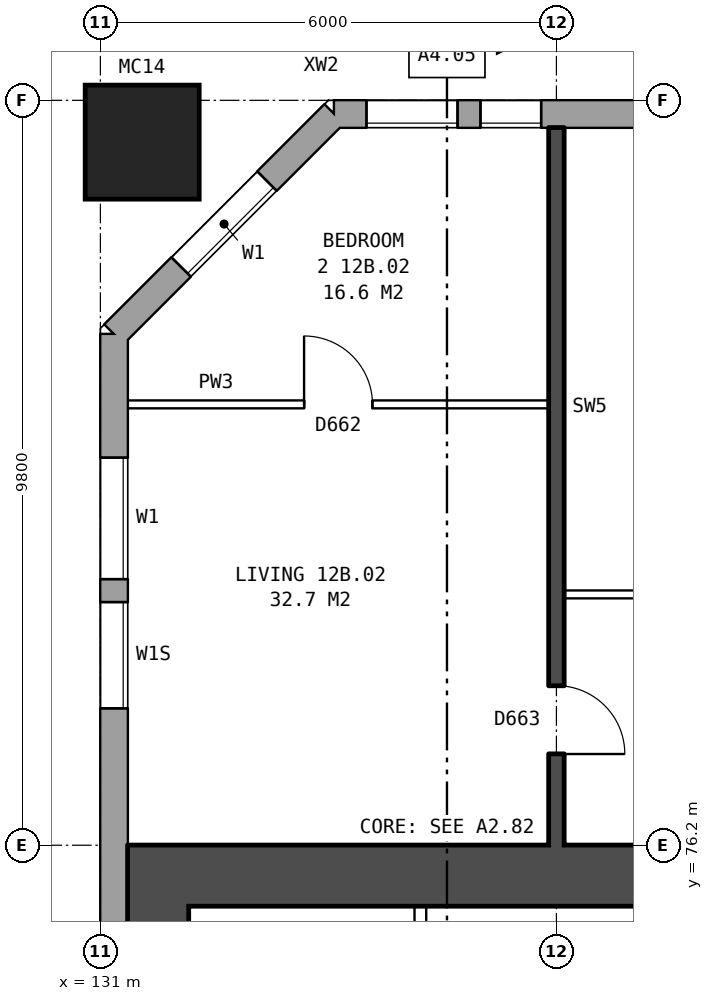
"""IFC4 building model, lengths in metres.
Left out: names, types, materials, properties, quantities, classifications, styles, units other than length and angle.
Written with IfcOpenShell. Run it as: python <this file> out.ifc"""

import sys

from ifc_helpers import new_model, si_unit, direction, frame, frame_2d, origin, origin_2d, place, context, subcontext, project, spatial, rectangle, hollow_rectangle, extrude, element, fill, save


model = new_model("IFC4")
c1 = context("Model", 3, precision=1e-05, world=origin(), true_north=direction((0.0, 1.0)))
c2 = subcontext(c1, "Body", "Model", "MODEL_VIEW")
j1 = project(units=[si_unit("LENGTHUNIT", "METRE"), si_unit("PLANEANGLEUNIT", "RADIAN")], contexts=[c1])
p1 = place(None, origin())
s1 = spatial("IfcSite", under=j1, at=p1, CompositionType="ELEMENT")
p2 = place(p1, origin())
s2 = spatial("IfcBuilding", under=s1, at=p2, CompositionType="ELEMENT")
p3 = place(p2, frame((0.0, 0.0, 47.4)))
s3 = spatial("IfcBuildingStorey", under=s2, at=p3, CompositionType="ELEMENT", Elevation=47.4)
p4 = place(p3, frame((131.55, 85.45, 0.0), z_axis=(0.0, 0.0, 1.0), x_axis=(1.0, 0.0, 0.0)))
e1 = element("IfcColumn", 1, at=p4, inside=s3, PredefinedType="COLUMN", context=c2, shape_type="SweptSolid", body=[
    extrude(hollow_rectangle(XDim=1.5, YDim=1.5, WallThickness=0.08, at=origin_2d()), origin(), (0.0, 0.0, 1.0), 3.1),
])
p5 = place(p3, frame((173.425, 85.82, 0.0), z_axis=(0.0, 0.0, 1.0), x_axis=(-1.0, 0.0, 0.0)))
e2 = element("IfcWall", 2, at=p5, inside=s3, PredefinedType="STANDARD", context=c2, shape_type="SweptSolid", body=[
    extrude(rectangle(XDim=39.351, YDim=0.36, at=frame_2d((19.675, 0.0))), origin(), (0.0, 0.0, 1.0), 2.85),
])
p6 = place(p5, frame((0.625, 0.0, 0.8)))
e3 = element("IfcOpeningElement", 3, at=p6, cuts=e2, PredefinedType="OPENING", context=c2, shape_type="SweptSolid", body=[
    extrude(rectangle(XDim=1.0, YDim=1.8, at=frame_2d((0.5, 0.9))), frame((0.0, 0.19, 0.0), z_axis=(0.0, -1.0, 0.0), x_axis=(1.0, 0.0, 0.0)), (0.0, 0.0, 1.0), 0.38),
])
p7 = place(p5, frame((1.925, 0.0, 1.7)))
e4 = element("IfcOpeningElement", 4, at=p7, cuts=e2, PredefinedType="OPENING", context=c2, shape_type="SweptSolid", body=[
    extrude(rectangle(XDim=0.8, YDim=0.9, at=frame_2d((0.4, 0.45))), frame((0.0, 0.19, 0.0), z_axis=(0.0, -1.0, 0.0), x_axis=(1.0, 0.0, 0.0)), (0.0, 0.0, 1.0), 0.38),
])
p8 = place(p5, frame((7.125, 0.0, 0.8)))
e5 = element("IfcOpeningElement", 5, at=p8, cuts=e2, PredefinedType="OPENING", context=c2, shape_type="SweptSolid", body=[
    extrude(rectangle(XDim=1.6, YDim=1.8, at=frame_2d((0.8, 0.9))), frame((0.0, 0.19, 0.0), z_axis=(0.0, -1.0, 0.0), x_axis=(1.0, 0.0, 0.0)), (0.0, 0.0, 1.0), 0.38),
])
p9 = place(p5, frame((10.125, 0.0, 0.8)))
e6 = element("IfcOpeningElement", 6, at=p9, cuts=e2, PredefinedType="OPENING", context=c2, shape_type="SweptSolid", body=[
    extrude(rectangle(XDim=1.6, YDim=1.8, at=frame_2d((0.8, 0.9))), frame((0.0, 0.19, 0.0), z_axis=(0.0, -1.0, 0.0), x_axis=(1.0, 0.0, 0.0)), (0.0, 0.0, 1.0), 0.38),
])
p10 = place(p5, frame((13.125, 0.0, 0.8)))
e7 = element("IfcOpeningElement", 7, at=p10, cuts=e2, PredefinedType="OPENING", context=c2, shape_type="SweptSolid", body=[
    extrude(rectangle(XDim=1.6, YDim=1.8, at=frame_2d((0.8, 0.9))), frame((0.0, 0.19, 0.0), z_axis=(0.0, -1.0, 0.0), x_axis=(1.0, 0.0, 0.0)), (0.0, 0.0, 1.0), 0.38),
])
p11 = place(p5, frame((16.125, 0.0, 0.8)))
e8 = element("IfcOpeningElement", 8, at=p11, cuts=e2, PredefinedType="OPENING", context=c2, shape_type="SweptSolid", body=[
    extrude(rectangle(XDim=1.6, YDim=1.8, at=frame_2d((0.8, 0.9))), frame((0.0, 0.19, 0.0), z_axis=(0.0, -1.0, 0.0), x_axis=(1.0, 0.0, 0.0)), (0.0, 0.0, 1.0), 0.38),
])
p12 = place(p5, frame((19.125, 0.0, 0.8)))
e9 = element("IfcOpeningElement", 9, at=p12, cuts=e2, PredefinedType="OPENING", context=c2, shape_type="SweptSolid", body=[
    extrude(rectangle(XDim=1.6, YDim=1.8, at=frame_2d((0.8, 0.9))), frame((0.0, 0.19, 0.0), z_axis=(0.0, -1.0, 0.0), x_axis=(1.0, 0.0, 0.0)), (0.0, 0.0, 1.0), 0.38),
])
p13 = place(p5, frame((22.125, 0.0, 0.8)))
e10 = element("IfcOpeningElement", 10, at=p13, cuts=e2, PredefinedType="OPENING", context=c2, shape_type="SweptSolid", body=[
    extrude(rectangle(XDim=1.6, YDim=1.8, at=frame_2d((0.8, 0.9))), frame((0.0, 0.19, 0.0), z_axis=(0.0, -1.0, 0.0), x_axis=(1.0, 0.0, 0.0)), (0.0, 0.0, 1.0), 0.38),
])
p14 = place(p5, frame((25.125, 0.0, 0.8)))
e11 = element("IfcOpeningElement", 11, at=p14, cuts=e2, PredefinedType="OPENING", context=c2, shape_type="SweptSolid", body=[
    extrude(rectangle(XDim=1.6, YDim=1.8, at=frame_2d((0.8, 0.9))), frame((0.0, 0.19, 0.0), z_axis=(0.0, -1.0, 0.0), x_axis=(1.0, 0.0, 0.0)), (0.0, 0.0, 1.0), 0.38),
])
p15 = place(p5, frame((28.125, 0.0, 0.8)))
e12 = element("IfcOpeningElement", 12, at=p15, cuts=e2, PredefinedType="OPENING", context=c2, shape_type="SweptSolid", body=[
    extrude(rectangle(XDim=1.6, YDim=1.8, at=frame_2d((0.8, 0.9))), frame((0.0, 0.19, 0.0), z_axis=(0.0, -1.0, 0.0), x_axis=(1.0, 0.0, 0.0)), (0.0, 0.0, 1.0), 0.38),
])
p16 = place(p5, frame((31.125, 0.0, 0.8)))
e13 = element("IfcOpeningElement", 13, at=p16, cuts=e2, PredefinedType="OPENING", context=c2, shape_type="SweptSolid", body=[
    extrude(rectangle(XDim=1.6, YDim=1.8, at=frame_2d((0.8, 0.9))), frame((0.0, 0.19, 0.0), z_axis=(0.0, -1.0, 0.0), x_axis=(1.0, 0.0, 0.0)), (0.0, 0.0, 1.0), 0.38),
])
p17 = place(p5, frame((33.025, 0.0, 0.8)))
e14 = element("IfcOpeningElement", 14, at=p17, cuts=e2, PredefinedType="OPENING", context=c2, shape_type="SweptSolid", body=[
    extrude(rectangle(XDim=1.2, YDim=1.8, at=frame_2d((0.6, 0.9))), frame((0.0, 0.19, 0.0), z_axis=(0.0, -1.0, 0.0), x_axis=(1.0, 0.0, 0.0)), (0.0, 0.0, 1.0), 0.38),
])
p18 = place(p5, frame((36.625, 0.0, 1.7)))
e15 = element("IfcOpeningElement", 15, at=p18, cuts=e2, PredefinedType="OPENING", context=c2, shape_type="SweptSolid", body=[
    extrude(rectangle(XDim=0.8, YDim=0.9, at=frame_2d((0.4, 0.45))), frame((0.0, 0.19, 0.0), z_axis=(0.0, -1.0, 0.0), x_axis=(1.0, 0.0, 0.0)), (0.0, 0.0, 1.0), 0.38),
])
p19 = place(p5, frame((3.925, 0.0, 0.8)))
e16 = element("IfcOpeningElement", 16, at=p19, cuts=e2, PredefinedType="OPENING", context=c2, shape_type="SweptSolid", body=[
    extrude(rectangle(XDim=0.8, YDim=0.9, at=frame_2d((0.4, 0.45))), frame((0.0, 0.19, 0.0), z_axis=(0.0, -1.0, 0.0), x_axis=(1.0, 0.0, 0.0)), (0.0, 0.0, 1.0), 0.38),
])
p20 = place(p5, frame((5.025, 0.0, 0.8)))
e17 = element("IfcOpeningElement", 17, at=p20, cuts=e2, PredefinedType="OPENING", context=c2, shape_type="SweptSolid", body=[
    extrude(rectangle(XDim=1.2, YDim=1.8, at=frame_2d((0.6, 0.9))), frame((0.0, 0.19, 0.0), z_axis=(0.0, -1.0, 0.0), x_axis=(1.0, 0.0, 0.0)), (0.0, 0.0, 1.0), 0.38),
])
p21 = place(p5, frame((34.525, 0.0, 0.8)))
e18 = element("IfcOpeningElement", 18, at=p21, cuts=e2, PredefinedType="OPENING", context=c2, shape_type="SweptSolid", body=[
    extrude(rectangle(XDim=0.8, YDim=0.9, at=frame_2d((0.4, 0.45))), frame((0.0, 0.19, 0.0), z_axis=(0.0, -1.0, 0.0), x_axis=(1.0, 0.0, 0.0)), (0.0, 0.0, 1.0), 0.38),
])
p22 = place(p5, frame((37.725, 0.0, 0.8)))
e19 = element("IfcOpeningElement", 19, at=p22, cuts=e2, PredefinedType="OPENING", context=c2, shape_type="SweptSolid", body=[
    extrude(rectangle(XDim=1.2, YDim=1.8, at=frame_2d((0.6, 0.9))), frame((0.0, 0.19, 0.0), z_axis=(0.0, -1.0, 0.0), x_axis=(1.0, 0.0, 0.0)), (0.0, 0.0, 1.0), 0.38),
])
p23 = place(p3, frame((134.075, 85.82, 0.0), z_axis=(0.0, 0.0, 1.0), x_axis=(-0.707106781187, -0.707106781187, 0.0)))
e20 = element("IfcWall", 20, at=p23, inside=s3, PredefinedType="STANDARD", context=c2, shape_type="SweptSolid", body=[
    extrude(rectangle(XDim=4.094, YDim=0.36, at=frame_2d((2.047, 0.0))), origin(), (0.0, 0.0, 1.0), 2.85),
])
p24 = place(p23, frame((1.247, 0.0, 0.8)))
e21 = element("IfcOpeningElement", 21, at=p24, cuts=e20, PredefinedType="OPENING", context=c2, shape_type="SweptSolid", body=[
    extrude(rectangle(XDim=1.6, YDim=1.8, at=frame_2d((0.8, 0.9))), frame((0.0, 0.19, 0.0), z_axis=(0.0, -1.0, 0.0), x_axis=(1.0, 0.0, 0.0)), (0.0, 0.0, 1.0), 0.38),
])
p25 = place(p3, frame((131.18, 82.925, 0.0), z_axis=(0.0, 0.0, 1.0), x_axis=(0.0, -1.0, 0.0)))
e22 = element("IfcWall", 22, at=p25, inside=s3, PredefinedType="STANDARD", context=c2, shape_type="SweptSolid", body=[
    extrude(rectangle(XDim=25.851, YDim=0.36, at=frame_2d((12.925, 0.0))), origin(), (0.0, 0.0, 1.0), 2.85),
])
p26 = place(p25, frame((1.625, 0.0, 0.8)))
e23 = element("IfcOpeningElement", 23, at=p26, cuts=e22, PredefinedType="OPENING", context=c2, shape_type="SweptSolid", body=[
    extrude(rectangle(XDim=1.6, YDim=1.8, at=frame_2d((0.8, 0.9))), frame((0.0, 0.19, 0.0), z_axis=(0.0, -1.0, 0.0), x_axis=(1.0, 0.0, 0.0)), (0.0, 0.0, 1.0), 0.38),
])
p27 = place(p25, frame((3.525, 0.0, 1.7)))
e24 = element("IfcOpeningElement", 24, at=p27, cuts=e22, PredefinedType="OPENING", context=c2, shape_type="SweptSolid", body=[
    extrude(rectangle(XDim=1.4, YDim=0.9, at=frame_2d((0.7, 0.45))), frame((0.0, 0.19, 0.0), z_axis=(0.0, -1.0, 0.0), x_axis=(1.0, 0.0, 0.0)), (0.0, 0.0, 1.0), 0.38),
])
p28 = place(p25, frame((20.825, 0.0, 1.7)))
e25 = element("IfcOpeningElement", 25, at=p28, cuts=e22, PredefinedType="OPENING", context=c2, shape_type="SweptSolid", body=[
    extrude(rectangle(XDim=1.4, YDim=0.9, at=frame_2d((0.7, 0.45))), frame((0.0, 0.19, 0.0), z_axis=(0.0, -1.0, 0.0), x_axis=(1.0, 0.0, 0.0)), (0.0, 0.0, 1.0), 0.38),
])
p29 = place(p25, frame((22.625, 0.0, 0.8)))
e26 = element("IfcOpeningElement", 26, at=p29, cuts=e22, PredefinedType="OPENING", context=c2, shape_type="SweptSolid", body=[
    extrude(rectangle(XDim=1.6, YDim=1.8, at=frame_2d((0.8, 0.9))), frame((0.0, 0.19, 0.0), z_axis=(0.0, -1.0, 0.0), x_axis=(1.0, 0.0, 0.0)), (0.0, 0.0, 1.0), 0.38),
])
p30 = place(p3, frame((131.76, 64.6, 0.0), z_axis=(0.0, 0.0, 1.0), x_axis=(0.0, 1.0, 0.0)))
e27 = element("IfcWall", 27, at=p30, inside=s3, PredefinedType="SHEAR", context=c2, shape_type="SweptSolid", body=[
    extrude(rectangle(XDim=10.8, YDim=0.8, at=frame_2d((5.4, 0.0))), origin(), (0.0, 0.0, 1.0), 2.85),
])
p31 = place(p3, frame((139.76, 75.8, 0.0), z_axis=(0.0, 0.0, 1.0), x_axis=(-1.0, 0.0, 0.0)))
e28 = element("IfcWall", 28, at=p31, inside=s3, PredefinedType="SHEAR", context=c2, shape_type="SweptSolid", body=[
    extrude(rectangle(XDim=8.4, YDim=0.8, at=frame_2d((4.2, 0.0))), origin(), (0.0, 0.0, 1.0), 2.85),
])
p32 = place(p3, frame((135.21, 71.425, 0.0), z_axis=(0.0, 0.0, 1.0), x_axis=(0.0, 1.0, 0.0)))
e29 = element("IfcWall", 29, at=p32, inside=s3, PredefinedType="PARTITIONING", context=c2, shape_type="SweptSolid", body=[
    extrude(rectangle(XDim=3.975, YDim=0.15, at=frame_2d((1.987, 0.0))), origin(), (0.0, 0.0, 1.0), 2.85),
])
p33 = place(p32, frame((0.462, 0.0, 0.0)))
e30 = element("IfcOpeningElement", 30, at=p33, cuts=e29, PredefinedType="OPENING", context=c2, shape_type="SweptSolid", body=[
    extrude(rectangle(XDim=1.1, YDim=2.1, at=frame_2d((0.55, 1.05))), frame((0.0, 0.085, 0.0), z_axis=(0.0, -1.0, 0.0), x_axis=(1.0, 0.0, 0.0)), (0.0, 0.0, 1.0), 0.17),
])
p34 = place(p3, frame((137.1, 79.5, 0.0), z_axis=(0.0, 0.0, 1.0), x_axis=(1.0, 0.0, 0.0)))
e31 = element("IfcWall", 31, at=p34, inside=s3, PredefinedType="PARTITIONING", context=c2, shape_type="SweptSolid", body=[
    extrude(rectangle(XDim=5.8, YDim=0.1, at=frame_2d((2.9, 0.0))), origin(), (0.0, 0.0, 1.0), 2.85),
])
p35 = place(p34, frame((1.3, 0.0, 0.0)))
e32 = element("IfcOpeningElement", 32, at=p35, cuts=e31, PredefinedType="OPENING", context=c2, shape_type="SweptSolid", body=[
    extrude(rectangle(XDim=0.9, YDim=2.1, at=frame_2d((0.45, 1.05))), frame((0.0, 0.06, 0.0), z_axis=(0.0, -1.0, 0.0), x_axis=(1.0, 0.0, 0.0)), (0.0, 0.0, 1.0), 0.12),
])
p36 = place(p34, frame((4.2, 0.0, 0.0)))
e33 = element("IfcOpeningElement", 33, at=p36, cuts=e31, PredefinedType="OPENING", context=c2, shape_type="SweptSolid", body=[
    extrude(rectangle(XDim=0.9, YDim=2.1, at=frame_2d((0.45, 1.05))), frame((0.0, 0.06, 0.0), z_axis=(0.0, -1.0, 0.0), x_axis=(1.0, 0.0, 0.0)), (0.0, 0.0, 1.0), 0.12),
])
p37 = place(p3, frame((131.36, 82.0, 0.0), z_axis=(0.0, 0.0, 1.0), x_axis=(1.0, 0.0, 0.0)))
e34 = element("IfcWall", 34, at=p37, inside=s3, PredefinedType="PARTITIONING", context=c2, shape_type="SweptSolid", body=[
    extrude(rectangle(XDim=5.54, YDim=0.1, at=frame_2d((2.77, 0.0))), origin(), (0.0, 0.0, 1.0), 2.85),
])
p38 = place(p37, frame((2.32, 0.0, 0.0)))
e35 = element("IfcOpeningElement", 35, at=p38, cuts=e34, PredefinedType="OPENING", context=c2, shape_type="SweptSolid", body=[
    extrude(rectangle(XDim=0.9, YDim=2.1, at=frame_2d((0.45, 1.05))), frame((0.0, 0.06, 0.0), z_axis=(0.0, -1.0, 0.0), x_axis=(1.0, 0.0, 0.0)), (0.0, 0.0, 1.0), 0.12),
])
p39 = place(p3, frame((137.0, 76.2, 0.0), z_axis=(0.0, 0.0, 1.0), x_axis=(0.0, 1.0, 0.0)))
e36 = element("IfcWall", 36, at=p39, inside=s3, PredefinedType="SOLIDWALL", context=c2, shape_type="SweptSolid", body=[
    extrude(rectangle(XDim=9.44, YDim=0.2, at=frame_2d((4.72, 0.0))), origin(), (0.0, 0.0, 1.0), 2.85),
])
p40 = place(p39, frame((1.2, 0.0, 0.0)))
e37 = element("IfcOpeningElement", 37, at=p40, cuts=e36, PredefinedType="OPENING", context=c2, shape_type="SweptSolid", body=[
    extrude(rectangle(XDim=0.9, YDim=2.1, at=frame_2d((0.45, 1.05))), frame((0.0, 0.11, 0.0), z_axis=(0.0, -1.0, 0.0), x_axis=(1.0, 0.0, 0.0)), (0.0, 0.0, 1.0), 0.22),
])
p41 = place(p18, origin())
e38 = element("IfcWindow", 38, at=p41, inside=s3, PartitioningType="SINGLE_PANEL", PredefinedType="WINDOW", context=c2, shape_type="SweptSolid", body=[
    extrude(rectangle(XDim=0.8, YDim=0.9, at=frame_2d((0.4, 0.45))), frame((0.0, 0.15, 0.0), z_axis=(0.0, -1.0, 0.0), x_axis=(1.0, 0.0, 0.0)), (0.0, 0.0, 1.0), 0.06),
])
fill(e15, e38)
p42 = place(p24, origin())
e39 = element("IfcWindow", 39, at=p42, inside=s3, PartitioningType="SINGLE_PANEL", PredefinedType="WINDOW", context=c2, shape_type="SweptSolid", body=[
    extrude(rectangle(XDim=1.6, YDim=1.8, at=frame_2d((0.8, 0.9))), frame((0.0, 0.15, 0.0), z_axis=(0.0, -1.0, 0.0), x_axis=(1.0, 0.0, 0.0)), (0.0, 0.0, 1.0), 0.06),
])
fill(e21, e39)
p43 = place(p26, origin())
e40 = element("IfcWindow", 40, at=p43, inside=s3, PartitioningType="SINGLE_PANEL", PredefinedType="WINDOW", context=c2, shape_type="SweptSolid", body=[
    extrude(rectangle(XDim=1.6, YDim=1.8, at=frame_2d((0.8, 0.9))), frame((0.0, 0.15, 0.0), z_axis=(0.0, -1.0, 0.0), x_axis=(1.0, 0.0, 0.0)), (0.0, 0.0, 1.0), 0.06),
])
fill(e23, e40)
p44 = place(p27, origin())
e41 = element("IfcWindow", 41, at=p44, inside=s3, PartitioningType="SINGLE_PANEL", PredefinedType="WINDOW", context=c2, shape_type="SweptSolid", body=[
    extrude(rectangle(XDim=1.4, YDim=0.9, at=frame_2d((0.7, 0.45))), frame((0.0, 0.15, 0.0), z_axis=(0.0, -1.0, 0.0), x_axis=(1.0, 0.0, 0.0)), (0.0, 0.0, 1.0), 0.06),
])
fill(e24, e41)
p45 = place(p38, origin())
e42 = element("IfcDoor", 42, at=p45, inside=s3, OperationType="SINGLE_SWING_LEFT", PredefinedType="DOOR", context=c2, shape_type="SweptSolid", body=[
    extrude(rectangle(XDim=0.9, YDim=2.1, at=frame_2d((0.45, 1.05))), frame((0.0, 0.025, 0.0), z_axis=(0.0, -1.0, 0.0), x_axis=(1.0, 0.0, 0.0)), (0.0, 0.0, 1.0), 0.05),
])
fill(e35, e42)
p46 = place(p40, frame((0.9, 0.0, 0.0), z_axis=(0.0, 0.0, 1.0), x_axis=(-1.0, 0.0, 0.0)))
e43 = element("IfcDoor", 43, at=p46, inside=s3, OperationType="SINGLE_SWING_RIGHT", PredefinedType="DOOR", context=c2, shape_type="SweptSolid", body=[
    extrude(rectangle(XDim=0.9, YDim=2.1, at=frame_2d((0.45, 1.05))), frame((0.0, 0.025, 0.0), z_axis=(0.0, -1.0, 0.0), x_axis=(1.0, 0.0, 0.0)), (0.0, 0.0, 1.0), 0.05),
])
fill(e37, e43)
p47 = place(p22, origin())
e44 = element("IfcWindow", 44, at=p47, inside=s3, PartitioningType="SINGLE_PANEL", PredefinedType="WINDOW", context=c2, shape_type="SweptSolid", body=[
    extrude(rectangle(XDim=1.2, YDim=1.8, at=frame_2d((0.6, 0.9))), frame((0.0, 0.15, 0.0), z_axis=(0.0, -1.0, 0.0), x_axis=(1.0, 0.0, 0.0)), (0.0, 0.0, 1.0), 0.06),
])
fill(e19, e44)
save(model, sys.argv[1])
